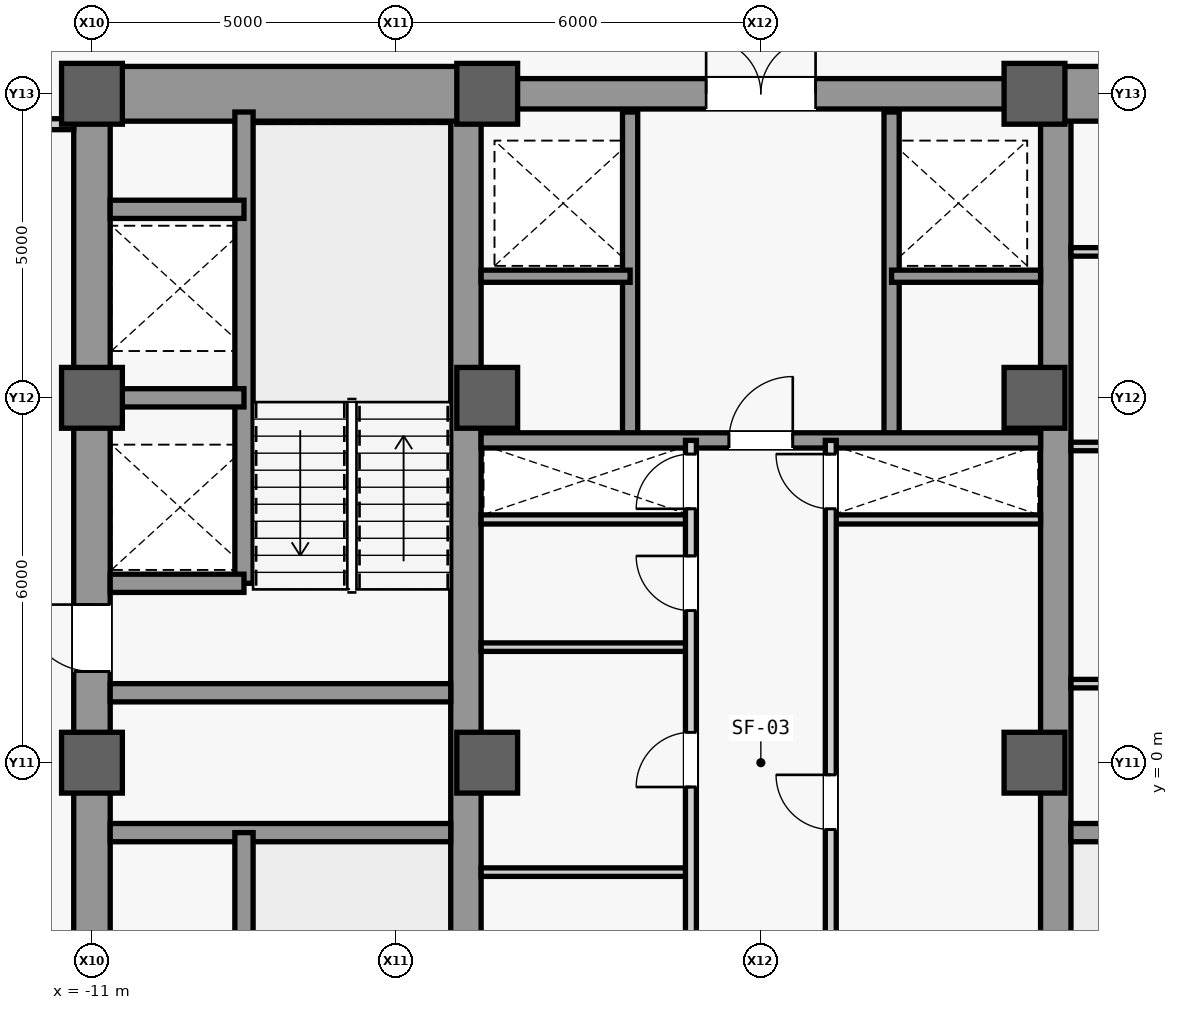
"""IFC4 building model, lengths in metres.
Left out: names, types, materials, properties, quantities, classifications, styles, units other than length and angle.
Written with IfcOpenShell. Run it as: python <this file> out.ifc"""

import sys

from ifc_helpers import new_model, si_unit, direction, frame, frame_2d, origin, origin_2d, place, context, subcontext, project, spatial, rectangle, extrude, source, transform, mapped, element, fill, save


model = new_model("IFC4")
c1 = context("Model", 3, precision=1e-05, world=origin(), true_north=direction((0.0, 1.0)))
c2 = subcontext(c1, "Body", "Model", "MODEL_VIEW")
j1 = project(units=[si_unit("LENGTHUNIT", "METRE"), si_unit("PLANEANGLEUNIT", "RADIAN")], contexts=[c1])
p1 = place(None, origin())
s1 = spatial("IfcSite", under=j1, at=p1, CompositionType="ELEMENT")
p2 = place(p1, origin())
s2 = spatial("IfcBuilding", under=s1, at=p2, CompositionType="ELEMENT")
p3 = place(p2, frame((0.0, 0.0, 87.2)))
s3 = spatial("IfcBuildingStorey", under=s2, at=p3, CompositionType="ELEMENT", Elevation=87.2)
m1 = source(origin(), c2, "Body", "SweptSolid", [
    extrude(rectangle(XDim=22.0, YDim=0.6, at=frame_2d((11.0, 0.0))), origin(), (0.0, 0.0, 1.0), 3.94),
])
p4 = place(p3, frame((-11.0, -11.0, 0.0), z_axis=(0.0, 0.0, 1.0), x_axis=(0.0, 1.0, 0.0)))
e1 = element("IfcWall", 1, at=p4, inside=s3, PredefinedType="SHEAR", context=c2, shape_type="MappedRepresentation", body=[
    mapped(m1, transform((0.0, 0.0, 0.0), scale=1.0)),
])
m2 = source(origin(), c2, "Body", "SweptSolid", [
    extrude(rectangle(XDim=1.1, YDim=2.2, at=frame_2d((0.55, 1.1))), frame((0.0, 0.31, 0.0), z_axis=(0.0, -1.0, 0.0), x_axis=(1.0, 0.0, 0.0)), (0.0, 0.0, 1.0), 0.62),
])
p5 = place(p4, frame((0.8, 0.0, 0.0)))
e2 = element("IfcOpeningElement", 2, at=p5, cuts=e1, PredefinedType="OPENING", context=c2, shape_type="MappedRepresentation", body=[
    mapped(m2, transform((0.0, 0.0, 0.0), scale=1.0)),
])
p6 = place(p4, frame((12.5, 0.0, 0.0)))
e3 = element("IfcOpeningElement", 3, at=p6, cuts=e1, PredefinedType="OPENING", context=c2, shape_type="MappedRepresentation", body=[
    mapped(m2, transform((0.0, 0.0, 0.0), scale=1.0)),
])
m3 = source(origin(), c2, "Body", "SweptSolid", [
    extrude(rectangle(XDim=0.9, YDim=2.15, at=frame_2d((0.45, 1.075))), frame((0.0, 0.31, 0.0), z_axis=(0.0, -1.0, 0.0), x_axis=(1.0, 0.0, 0.0)), (0.0, 0.0, 1.0), 0.62),
])
p7 = place(p4, frame((6.85, 0.0, 0.0)))
e4 = element("IfcOpeningElement", 4, at=p7, cuts=e1, PredefinedType="OPENING", context=c2, shape_type="MappedRepresentation", body=[
    mapped(m3, transform((0.0, 0.0, 0.0), scale=1.0)),
])
m4 = source(origin(), c2, "Body", "SweptSolid", [
    extrude(rectangle(XDim=1.3, YDim=2.3, at=frame_2d((0.65, 1.15))), frame((0.0, 0.31, 0.0), z_axis=(0.0, -1.0, 0.0), x_axis=(1.0, 0.0, 0.0)), (0.0, 0.0, 1.0), 0.62),
])
p8 = place(p4, frame((2.7, 0.0, 0.0)))
e5 = element("IfcOpeningElement", 5, at=p8, cuts=e1, PredefinedType="OPENING", context=c2, shape_type="MappedRepresentation", body=[
    mapped(m4, transform((0.0, 0.0, 0.0), scale=1.0)),
])
m5 = source(origin(), c2, "Body", "SweptSolid", [
    extrude(rectangle(XDim=21.4, YDim=0.5, at=frame_2d((10.7, 0.0))), origin(), (0.0, 0.0, 1.0), 3.94),
])
for number, where, z_axis, x_axis in (
    (6, (-4.85, -10.7, 0.0), (0.0, 0.0, 1.0), (0.0, 1.0, 0.0)),
    (7, (4.85, -10.7, 0.0), (0.0, 0.0, 1.0), (0.0, 1.0, 0.0)),
):
    element("IfcWall", number, at=place(p3, frame(where, z_axis=z_axis, x_axis=x_axis)), inside=s3, PredefinedType="SHEAR", context=c2, shape_type="MappedRepresentation", body=[
        mapped(m5, transform((0.0, 0.0, 0.0), scale=1.0)),
    ])
m6 = source(origin(), c2, "Body", "SweptSolid", [
    extrude(rectangle(XDim=5.85, YDim=0.9, at=frame_2d((2.925, 0.0))), origin(), (0.0, 0.0, 1.0), 3.94),
])
p9 = place(p3, frame((-10.7, 11.0, 0.0), z_axis=(0.0, 0.0, 1.0), x_axis=(1.0, 0.0, 0.0)))
e8 = element("IfcWall", 8, at=p9, inside=s3, PredefinedType="SHEAR", context=c2, shape_type="MappedRepresentation", body=[
    mapped(m6, transform((0.0, 0.0, 0.0), scale=1.0)),
])
p10 = place(p3, frame((4.85, 11.0, 0.0), z_axis=(0.0, 0.0, 1.0), x_axis=(1.0, 0.0, 0.0)))
e9 = element("IfcWall", 9, at=p10, inside=s3, PredefinedType="SHEAR", context=c2, shape_type="MappedRepresentation", body=[
    mapped(m6, transform((0.0, 0.0, 0.0), scale=1.0)),
])
m7 = source(origin(), c2, "Body", "SweptSolid", [
    extrude(rectangle(XDim=1.05, YDim=2.2, at=frame_2d((0.525, 1.1))), frame((0.0, 0.46, 0.0), z_axis=(0.0, -1.0, 0.0), x_axis=(1.0, 0.0, 0.0)), (0.0, 0.0, 1.0), 0.92),
])
p11 = place(p10, frame((1.375, 0.0, 0.0)))
e10 = element("IfcOpeningElement", 10, at=p11, cuts=e9, PredefinedType="OPENING", context=c2, shape_type="MappedRepresentation", body=[
    mapped(m7, transform((0.0, 0.0, 0.0), scale=1.0)),
])
m8 = source(origin(), c2, "Body", "SweptSolid", [
    extrude(rectangle(XDim=5.6, YDim=0.3, at=frame_2d((2.8, 0.0))), origin(), (0.0, 0.0, 1.0), 3.94),
])
for number, where, z_axis, x_axis in (
    (11, (-10.7, -1.15, 0.0), (0.0, 0.0, 1.0), (1.0, 0.0, 0.0)),
    (12, (-10.7, 1.15, 0.0), (0.0, 0.0, 1.0), (1.0, 0.0, 0.0)),
    (13, (5.1, -1.15, 0.0), (0.0, 0.0, 1.0), (1.0, 0.0, 0.0)),
):
    element("IfcWall", number, at=place(p3, frame(where, z_axis=z_axis, x_axis=x_axis)), inside=s3, PredefinedType="SHEAR", context=c2, shape_type="MappedRepresentation", body=[
        mapped(m8, transform((0.0, 0.0, 0.0), scale=1.0)),
    ])
m9 = source(origin(), c2, "Body", "SweptSolid", [
    extrude(rectangle(XDim=9.2, YDim=0.5, at=frame_2d((4.6, 0.0))), origin(), (0.0, 0.0, 1.0), 3.94),
])
p12 = place(p3, frame((-4.6, 11.0, 0.0), z_axis=(0.0, 0.0, 1.0), x_axis=(1.0, 0.0, 0.0)))
e14 = element("IfcWall", 14, at=p12, inside=s3, PredefinedType="SHEAR", context=c2, shape_type="MappedRepresentation", body=[
    mapped(m9, transform((0.0, 0.0, 0.0), scale=1.0)),
])
m10 = source(origin(), c2, "Body", "SweptSolid", [
    extrude(rectangle(XDim=1.8, YDim=2.25, at=frame_2d((0.9, 1.125))), frame((0.0, 0.26, 0.0), z_axis=(0.0, -1.0, 0.0), x_axis=(1.0, 0.0, 0.0)), (0.0, 0.0, 1.0), 0.52),
])
p13 = place(p12, frame((3.7, 0.0, 0.0)))
e15 = element("IfcOpeningElement", 15, at=p13, cuts=e14, PredefinedType="OPENING", context=c2, shape_type="MappedRepresentation", body=[
    mapped(m10, transform((0.0, 0.0, 0.0), scale=1.0)),
])
m11 = source(origin(), c2, "Body", "SweptSolid", [
    extrude(rectangle(XDim=1.0, YDim=1.0, at=origin_2d()), origin(), (0.0, 0.0, 1.0), 4.2),
])
for number, where, z_axis, x_axis in (
    (16, (-11.0, 0.0, 0.0), (0.0, 0.0, 1.0), (1.0, 0.0, 0.0)),
    (17, (-11.0, 6.0, 0.0), (0.0, 0.0, 1.0), (1.0, 0.0, 0.0)),
    (18, (-11.0, 11.0, 0.0), (0.0, 0.0, 1.0), (1.0, 0.0, 0.0)),
    (19, (-4.5, 0.0, 0.0), (0.0, 0.0, 1.0), (1.0, 0.0, 0.0)),
    (20, (-4.5, 6.0, 0.0), (0.0, 0.0, 1.0), (1.0, 0.0, 0.0)),
    (21, (-4.5, 11.0, 0.0), (0.0, 0.0, 1.0), (1.0, 0.0, 0.0)),
    (22, (4.5, 0.0, 0.0), (0.0, 0.0, 1.0), (1.0, 0.0, 0.0)),
    (23, (4.5, 6.0, 0.0), (0.0, 0.0, 1.0), (1.0, 0.0, 0.0)),
    (24, (4.5, 11.0, 0.0), (0.0, 0.0, 1.0), (1.0, 0.0, 0.0)),
):
    element("IfcColumn", number, at=place(p3, frame(where, z_axis=z_axis, x_axis=x_axis)), inside=s3, PredefinedType="COLUMN", context=c2, shape_type="MappedRepresentation", body=[
        mapped(m11, transform((0.0, 0.0, 0.0), scale=1.0)),
    ])
m12 = source(origin(), c2, "Body", "SweptSolid", [
    extrude(rectangle(XDim=7.8, YDim=0.3, at=frame_2d((3.9, 0.0))), origin(), (0.0, 0.0, 1.0), 3.94),
])
p14 = place(p3, frame((-8.5, -8.95, 0.0), z_axis=(0.0, 0.0, 1.0), x_axis=(0.0, 1.0, 0.0)))
e25 = element("IfcWall", 25, at=p14, inside=s3, PredefinedType="SHEAR", context=c2, shape_type="MappedRepresentation", body=[
    mapped(m12, transform((0.0, 0.0, 0.0), scale=1.0)),
])
m13 = source(origin(), c2, "Body", "SweptSolid", [
    extrude(rectangle(XDim=7.75, YDim=0.3, at=frame_2d((3.875, 0.0))), origin(), (0.0, 0.0, 1.0), 3.94),
])
p15 = place(p3, frame((-8.5, 2.95, 0.0), z_axis=(0.0, 0.0, 1.0), x_axis=(0.0, 1.0, 0.0)))
e26 = element("IfcWall", 26, at=p15, inside=s3, PredefinedType="SHEAR", context=c2, shape_type="MappedRepresentation", body=[
    mapped(m13, transform((0.0, 0.0, 0.0), scale=1.0)),
])
m14 = source(origin(), c2, "Body", "SweptSolid", [
    extrude(rectangle(XDim=2.2, YDim=0.3, at=frame_2d((1.1, 0.0))), origin(), (0.0, 0.0, 1.0), 3.94),
])
for number, where, z_axis, x_axis in (
    (27, (-10.7, 2.95, 0.0), (0.0, 0.0, 1.0), (1.0, 0.0, 0.0)),
    (28, (-10.7, 6.0, 0.0), (0.0, 0.0, 1.0), (1.0, 0.0, 0.0)),
    (29, (-10.7, 9.1, 0.0), (0.0, 0.0, 1.0), (1.0, 0.0, 0.0)),
):
    element("IfcWall", number, at=place(p3, frame(where, z_axis=z_axis, x_axis=x_axis)), inside=s3, PredefinedType="SHEAR", context=c2, shape_type="MappedRepresentation", body=[
        mapped(m14, transform((0.0, 0.0, 0.0), scale=1.0)),
    ])
m15 = source(origin(), c2, "Body", "SweptSolid", [
    extrude(rectangle(XDim=3.15, YDim=0.14, at=frame_2d((1.575, 0.0))), origin(), (0.0, 0.0, 1.0), 3.94),
])
p16 = place(p3, frame((5.1, 1.3, 0.0), z_axis=(0.0, 0.0, 1.0), x_axis=(1.0, 0.0, 0.0)))
e30 = element("IfcWall", 30, at=p16, inside=s3, PredefinedType="PARTITIONING", context=c2, shape_type="MappedRepresentation", body=[
    mapped(m15, transform((0.0, 0.0, 0.0), scale=1.0)),
])
p17 = place(p3, frame((5.1, 8.4, 0.0), z_axis=(0.0, 0.0, 1.0), x_axis=(1.0, 0.0, 0.0)))
e31 = element("IfcWall", 31, at=p17, inside=s3, PredefinedType="PARTITIONING", context=c2, shape_type="MappedRepresentation", body=[
    mapped(m15, transform((0.0, 0.0, 0.0), scale=1.0)),
])
m16 = source(origin(), c2, "Body", "SweptSolid", [
    extrude(rectangle(XDim=0.9, YDim=2.15, at=frame_2d((0.45, 1.075))), frame((0.0, 0.08, 0.0), z_axis=(0.0, -1.0, 0.0), x_axis=(1.0, 0.0, 0.0)), (0.0, 0.0, 1.0), 0.16),
])
p18 = place(p17, frame((1.13, 0.0, 0.0)))
e32 = element("IfcOpeningElement", 32, at=p18, cuts=e31, PredefinedType="OPENING", context=c2, shape_type="MappedRepresentation", body=[
    mapped(m16, transform((0.0, 0.0, 0.0), scale=1.0)),
])
p19 = place(p3, frame((5.1, 5.2, 0.0), z_axis=(0.0, 0.0, 1.0), x_axis=(1.0, 0.0, 0.0)))
e33 = element("IfcWall", 33, at=p19, inside=s3, PredefinedType="PARTITIONING", context=c2, shape_type="MappedRepresentation", body=[
    mapped(m15, transform((0.0, 0.0, 0.0), scale=1.0)),
])
p20 = place(p19, frame((1.13, 0.0, 0.0)))
e34 = element("IfcOpeningElement", 34, at=p20, cuts=e33, PredefinedType="OPENING", context=c2, shape_type="MappedRepresentation", body=[
    mapped(m16, transform((0.0, 0.0, 0.0), scale=1.0)),
])
m17 = source(origin(), c2, "Body", "SweptSolid", [
    extrude(rectangle(XDim=4.05, YDim=0.18, at=frame_2d((2.025, 0.0))), origin(), (0.0, 0.0, 1.0), 3.94),
])
p21 = place(p3, frame((-15.35, 10.5, 0.0), z_axis=(0.0, 0.0, 1.0), x_axis=(1.0, 0.0, 0.0)))
e35 = element("IfcWall", 35, at=p21, inside=s3, PredefinedType="PARTITIONING", context=c2, shape_type="MappedRepresentation", body=[
    mapped(m17, transform((0.0, 0.0, 0.0), scale=1.0)),
])
m18 = source(origin(), c2, "Body", "SweptSolid", [
    extrude(rectangle(XDim=3.45, YDim=0.15, at=frame_2d((1.725, 0.0))), origin(), (0.0, 0.0, 1.0), 3.94),
])
for number, where, z_axis, x_axis in (
    (36, (-4.6, 4.0, 0.0), (0.0, 0.0, 1.0), (1.0, 0.0, 0.0)),
    (37, (1.15, 4.0, 0.0), (0.0, 0.0, 1.0), (1.0, 0.0, 0.0)),
):
    element("IfcWall", number, at=place(p3, frame(where, z_axis=z_axis, x_axis=x_axis)), inside=s3, PredefinedType="PARTITIONING", context=c2, shape_type="MappedRepresentation", body=[
        mapped(m18, transform((0.0, 0.0, 0.0), scale=1.0)),
    ])
m19 = source(origin(), c2, "Body", "SweptSolid", [
    extrude(rectangle(XDim=5.4, YDim=0.25, at=frame_2d((2.7, 0.0))), origin(), (0.0, 0.0, 1.0), 3.94),
])
for number, where, z_axis, x_axis in (
    (38, (-2.15, 5.3, 0.0), (0.0, 0.0, 1.0), (0.0, 1.0, 0.0)),
    (39, (2.15, 5.3, 0.0), (0.0, 0.0, 1.0), (0.0, 1.0, 0.0)),
):
    element("IfcWall", number, at=place(p3, frame(where, z_axis=z_axis, x_axis=x_axis)), inside=s3, PredefinedType="SHEAR", context=c2, shape_type="MappedRepresentation", body=[
        mapped(m19, transform((0.0, 0.0, 0.0), scale=1.0)),
    ])
m20 = source(origin(), c2, "Body", "SweptSolid", [
    extrude(rectangle(XDim=2.45, YDim=0.2, at=frame_2d((1.225, 0.0))), origin(), (0.0, 0.0, 1.0), 3.94),
])
for number, where, z_axis, x_axis in (
    (40, (-4.6, 8.0, 0.0), (0.0, 0.0, 1.0), (1.0, 0.0, 0.0)),
    (41, (2.15, 8.0, 0.0), (0.0, 0.0, 1.0), (1.0, 0.0, 0.0)),
):
    element("IfcWall", number, at=place(p3, frame(where, z_axis=z_axis, x_axis=x_axis)), inside=s3, PredefinedType="SHEAR", context=c2, shape_type="MappedRepresentation", body=[
        mapped(m20, transform((0.0, 0.0, 0.0), scale=1.0)),
    ])
m21 = source(origin(), c2, "Body", "SweptSolid", [
    extrude(rectangle(XDim=9.2, YDim=0.25, at=frame_2d((4.6, 0.0))), origin(), (0.0, 0.0, 1.0), 3.94),
])
p22 = place(p3, frame((-4.6, 5.3, 0.0), z_axis=(0.0, 0.0, 1.0), x_axis=(1.0, 0.0, 0.0)))
e42 = element("IfcWall", 42, at=p22, inside=s3, PredefinedType="SHEAR", context=c2, shape_type="MappedRepresentation", body=[
    mapped(m21, transform((0.0, 0.0, 0.0), scale=1.0)),
])
m22 = source(origin(), c2, "Body", "SweptSolid", [
    extrude(rectangle(XDim=1.05, YDim=2.2, at=frame_2d((0.525, 1.1))), frame((0.0, 0.135, 0.0), z_axis=(0.0, -1.0, 0.0), x_axis=(1.0, 0.0, 0.0)), (0.0, 0.0, 1.0), 0.27),
])
p23 = place(p22, frame((4.075, 0.0, 0.0)))
e43 = element("IfcOpeningElement", 43, at=p23, cuts=e42, PredefinedType="OPENING", context=c2, shape_type="MappedRepresentation", body=[
    mapped(m22, transform((0.0, 0.0, 0.0), scale=1.0)),
])
m23 = source(origin(), c2, "Body", "SweptSolid", [
    extrude(rectangle(XDim=3.45, YDim=0.14, at=frame_2d((1.725, 0.0))), origin(), (0.0, 0.0, 1.0), 3.94),
])
for number, where, z_axis, x_axis in (
    (44, (-4.6, -1.8, 0.0), (0.0, 0.0, 1.0), (1.0, 0.0, 0.0)),
    (45, (-4.6, 1.9, 0.0), (0.0, 0.0, 1.0), (1.0, 0.0, 0.0)),
):
    element("IfcWall", number, at=place(p3, frame(where, z_axis=z_axis, x_axis=x_axis)), inside=s3, PredefinedType="PARTITIONING", context=c2, shape_type="MappedRepresentation", body=[
        mapped(m23, transform((0.0, 0.0, 0.0), scale=1.0)),
    ])
m24 = source(origin(), c2, "Body", "SweptSolid", [
    extrude(rectangle(XDim=10.6, YDim=0.18, at=frame_2d((5.3, 0.0))), origin(), (0.0, 0.0, 1.0), 3.94),
])
p24 = place(p3, frame((-1.15, -5.3, 0.0), z_axis=(0.0, 0.0, 1.0), x_axis=(0.0, 1.0, 0.0)))
e46 = element("IfcWall", 46, at=p24, inside=s3, PredefinedType="PARTITIONING", context=c2, shape_type="MappedRepresentation", body=[
    mapped(m24, transform((0.0, 0.0, 0.0), scale=1.0)),
])
m25 = source(origin(), c2, "Body", "SweptSolid", [
    extrude(rectangle(XDim=0.9, YDim=2.15, at=frame_2d((0.45, 1.075))), frame((0.0, 0.1, 0.0), z_axis=(0.0, -1.0, 0.0), x_axis=(1.0, 0.0, 0.0)), (0.0, 0.0, 1.0), 0.2),
])
p25 = place(p24, frame((1.3, 0.0, 0.0)))
e47 = element("IfcOpeningElement", 47, at=p25, cuts=e46, PredefinedType="OPENING", context=c2, shape_type="MappedRepresentation", body=[
    mapped(m25, transform((0.0, 0.0, 0.0), scale=1.0)),
])
p26 = place(p24, frame((4.9, 0.0, 0.0)))
e48 = element("IfcOpeningElement", 48, at=p26, cuts=e46, PredefinedType="OPENING", context=c2, shape_type="MappedRepresentation", body=[
    mapped(m25, transform((0.0, 0.0, 0.0), scale=1.0)),
])
p27 = place(p24, frame((7.8, 0.0, 0.0)))
e49 = element("IfcOpeningElement", 49, at=p27, cuts=e46, PredefinedType="OPENING", context=c2, shape_type="MappedRepresentation", body=[
    mapped(m25, transform((0.0, 0.0, 0.0), scale=1.0)),
])
p28 = place(p24, frame((9.475, 0.0, 0.0)))
e50 = element("IfcOpeningElement", 50, at=p28, cuts=e46, PredefinedType="OPENING", context=c2, shape_type="MappedRepresentation", body=[
    mapped(m25, transform((0.0, 0.0, 0.0), scale=1.0)),
])
p29 = place(p3, frame((1.15, -5.3, 0.0), z_axis=(0.0, 0.0, 1.0), x_axis=(0.0, 1.0, 0.0)))
e51 = element("IfcWall", 51, at=p29, inside=s3, PredefinedType="PARTITIONING", context=c2, shape_type="MappedRepresentation", body=[
    mapped(m24, transform((0.0, 0.0, 0.0), scale=1.0)),
])
p30 = place(p29, frame((4.2, 0.0, 0.0)))
e52 = element("IfcOpeningElement", 52, at=p30, cuts=e51, PredefinedType="OPENING", context=c2, shape_type="MappedRepresentation", body=[
    mapped(m25, transform((0.0, 0.0, 0.0), scale=1.0)),
])
p31 = place(p29, frame((9.475, 0.0, 0.0)))
e53 = element("IfcOpeningElement", 53, at=p31, cuts=e51, PredefinedType="OPENING", context=c2, shape_type="MappedRepresentation", body=[
    mapped(m25, transform((0.0, 0.0, 0.0), scale=1.0)),
])
m26 = source(origin(), c2, "Body", "SweptSolid", [
    extrude(rectangle(XDim=1.1, YDim=2.2, at=frame_2d((0.55, 1.1))), frame((0.0, 0.025, 0.0), z_axis=(0.0, -1.0, 0.0), x_axis=(1.0, 0.0, 0.0)), (0.0, 0.0, 1.0), 0.05),
])
p32 = place(p6, origin())
e54 = element("IfcDoor", 54, at=p32, inside=s3, OperationType="SINGLE_SWING_RIGHT", PredefinedType="DOOR", context=c2, shape_type="MappedRepresentation", body=[
    mapped(m26, transform((0.0, 0.0, 0.0), scale=1.0)),
])
fill(e3, e54)
m27 = source(origin(), c2, "Body", "SweptSolid", [
    extrude(rectangle(XDim=1.05, YDim=2.2, at=frame_2d((0.525, 1.1))), frame((0.0, 0.025, 0.0), z_axis=(0.0, -1.0, 0.0), x_axis=(1.0, 0.0, 0.0)), (0.0, 0.0, 1.0), 0.05),
])
p33 = place(p23, origin())
e55 = element("IfcDoor", 55, at=p33, inside=s3, OperationType="SINGLE_SWING_RIGHT", PredefinedType="DOOR", context=c2, shape_type="MappedRepresentation", body=[
    mapped(m27, transform((0.0, 0.0, 0.0), scale=1.0)),
])
fill(e43, e55)
m28 = source(origin(), c2, "Body", "SweptSolid", [
    extrude(rectangle(XDim=1.8, YDim=2.25, at=frame_2d((0.9, 1.125))), frame((0.0, 0.025, 0.0), z_axis=(0.0, -1.0, 0.0), x_axis=(1.0, 0.0, 0.0)), (0.0, 0.0, 1.0), 0.05),
])
p34 = place(p13, origin())
e56 = element("IfcDoor", 56, at=p34, inside=s3, OperationType="SINGLE_SWING_RIGHT", PredefinedType="DOOR", context=c2, shape_type="MappedRepresentation", body=[
    mapped(m28, transform((0.0, 0.0, 0.0), scale=1.0)),
])
fill(e15, e56)
m29 = source(origin(), c2, "Body", "SweptSolid", [
    extrude(rectangle(XDim=0.9, YDim=2.15, at=frame_2d((0.45, 1.075))), frame((0.0, 0.025, 0.0), z_axis=(0.0, -1.0, 0.0), x_axis=(1.0, 0.0, 0.0)), (0.0, 0.0, 1.0), 0.05),
])
p35 = place(p26, origin())
e57 = element("IfcDoor", 57, at=p35, inside=s3, OperationType="SINGLE_SWING_LEFT", PredefinedType="DOOR", context=c2, shape_type="MappedRepresentation", body=[
    mapped(m29, transform((0.0, 0.0, 0.0), scale=1.0)),
])
fill(e48, e57)
p36 = place(p27, origin())
e58 = element("IfcDoor", 58, at=p36, inside=s3, OperationType="SINGLE_SWING_RIGHT", PredefinedType="DOOR", context=c2, shape_type="MappedRepresentation", body=[
    mapped(m29, transform((0.0, 0.0, 0.0), scale=1.0)),
])
fill(e49, e58)
p37 = place(p30, origin())
e59 = element("IfcDoor", 59, at=p37, inside=s3, OperationType="SINGLE_SWING_RIGHT", PredefinedType="DOOR", context=c2, shape_type="MappedRepresentation", body=[
    mapped(m29, transform((0.0, 0.0, 0.0), scale=1.0)),
])
fill(e52, e59)
p38 = place(p28, origin())
e60 = element("IfcDoor", 60, at=p38, inside=s3, OperationType="SINGLE_SWING_LEFT", PredefinedType="DOOR", context=c2, shape_type="MappedRepresentation", body=[
    mapped(m29, transform((0.0, 0.0, 0.0), scale=1.0)),
])
fill(e50, e60)
p39 = place(p31, origin())
e61 = element("IfcDoor", 61, at=p39, inside=s3, OperationType="SINGLE_SWING_RIGHT", PredefinedType="DOOR", context=c2, shape_type="MappedRepresentation", body=[
    mapped(m29, transform((0.0, 0.0, 0.0), scale=1.0)),
])
fill(e53, e61)
save(model, sys.argv[1])
